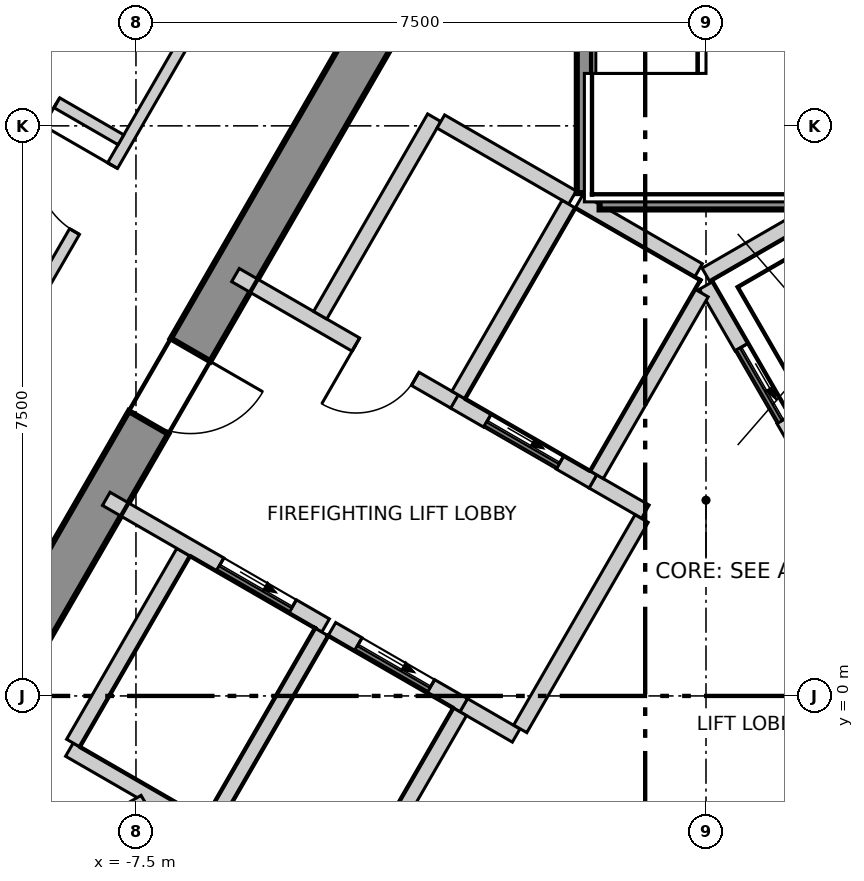
"""IFC4 building model, lengths in metres.
Left out: names, types, materials, properties, quantities, classifications, styles, units other than length and angle.
Written with IfcOpenShell. Run it as: python <this file> out.ifc"""

import sys

from ifc_helpers import new_model, si_unit, direction, frame, frame_2d, origin, place, context, subcontext, project, spatial, polyline, rectangle, outline, extrude, element, fill, save


model = new_model("IFC4")
c1 = context("Model", 3, precision=1e-05, world=origin(), true_north=direction((0.0, 1.0)))
c2 = subcontext(c1, "Body", "Model", "MODEL_VIEW")
j1 = project(units=[si_unit("LENGTHUNIT", "METRE"), si_unit("PLANEANGLEUNIT", "RADIAN")], contexts=[c1])
p1 = place(None, origin())
s1 = spatial("IfcSite", under=j1, at=p1, CompositionType="ELEMENT")
p2 = place(p1, origin())
s2 = spatial("IfcBuilding", under=s1, at=p2, CompositionType="ELEMENT")
p3 = place(p2, frame((0.0, 0.0, 279.1)))
s3 = spatial("IfcBuildingStorey", under=s2, at=p3, CompositionType="ELEMENT", Elevation=279.1)
p4 = place(p3, frame((-1.732, 13.3, -0.3), z_axis=(0.0, 0.0, 1.0), x_axis=(-0.500000539815, -0.866025092122, 0.0)))
e1 = element("IfcWall", 1, at=p4, inside=s3, PredefinedType="SHEAR", context=c2, shape_type="SweptSolid", body=[
    extrude(outline(polyline([(-0.173, -0.3), (1.795, -0.3), (3.763, -0.3), (5.732, -0.3), (7.7, -0.3), (9.668, -0.301), (11.637, -0.301), (13.605, -0.301), (15.573, -0.301), (17.542, -0.301), (19.51, -0.301), (21.478, -0.301), (21.131, 0.3), (19.226, 0.3), (17.321, 0.3), (15.415, 0.3), (13.51, 0.3), (11.605, 0.3), (9.699, 0.3), (7.794, 0.3), (5.889, 0.3), (3.984, 0.3), (2.078, 0.3), (0.173, 0.3), (-0.173, -0.3)])), origin(), (0.0, 0.0, 1.0), 3.6),
])
p5 = place(p4, frame((10.102, 0.0, 0.3)))
e2 = element("IfcOpeningElement", 2, at=p5, cuts=e1, PredefinedType="OPENING", context=c2, shape_type="SweptSolid", body=[
    extrude(rectangle(XDim=1.1, YDim=2.1, at=frame_2d((0.55, 1.05))), frame((0.0, 0.31, 0.0), z_axis=(0.0, -1.0, 0.0), x_axis=(1.0, 0.0, 0.0)), (0.0, 0.0, 1.0), 0.621),
])
p6 = place(p4, frame((15.627, 0.0, 0.3)))
e3 = element("IfcOpeningElement", 3, at=p6, cuts=e1, PredefinedType="OPENING", context=c2, shape_type="SweptSolid", body=[
    extrude(rectangle(XDim=0.9, YDim=2.1, at=frame_2d((0.45, 1.05))), frame((0.0, 0.31, 0.0), z_axis=(0.0, -1.0, 0.0), x_axis=(1.0, 0.0, 0.0)), (0.0, 0.0, 1.0), 0.621),
])
p7 = place(p3, frame((-2.536, 28.316, 0.0), z_axis=(0.0, 0.0, 1.0), x_axis=(-0.500006870765, -0.86602143691, 0.0)))
e4 = element("IfcWall", 4, at=p7, inside=s3, PredefinedType="ELEMENTEDWALL", context=c2, shape_type="SweptSolid", body=[
    extrude(rectangle(XDim=46.49, YDim=0.2, at=frame_2d((23.245, 0.0))), origin(), (0.0, 0.0, 1.0), 3.3),
])
p8 = place(p7, frame((2.196, 0.0, 0.9)))
e5 = element("IfcOpeningElement", 5, at=p8, cuts=e4, PredefinedType="OPENING", context=c2, shape_type="SweptSolid", body=[
    extrude(rectangle(XDim=3.7, YDim=2.2, at=frame_2d((1.85, 1.1))), frame((0.0, 0.11, 0.0), z_axis=(0.0, -1.0, 0.0), x_axis=(1.0, 0.0, 0.0)), (0.0, 0.0, 1.0), 0.22),
])
p9 = place(p7, frame((7.684, 0.0, 0.9)))
e6 = element("IfcOpeningElement", 6, at=p9, cuts=e4, PredefinedType="OPENING", context=c2, shape_type="SweptSolid", body=[
    extrude(rectangle(XDim=3.7, YDim=2.2, at=frame_2d((1.85, 1.1))), frame((0.0, 0.11, 0.0), z_axis=(0.0, -1.0, 0.0), x_axis=(1.0, 0.0, 0.0)), (0.0, 0.0, 1.0), 0.22),
])
p10 = place(p7, frame((13.172, 0.0, 0.9)))
e7 = element("IfcOpeningElement", 7, at=p10, cuts=e4, PredefinedType="OPENING", context=c2, shape_type="SweptSolid", body=[
    extrude(rectangle(XDim=3.7, YDim=2.2, at=frame_2d((1.85, 1.1))), frame((0.0, 0.11, 0.0), z_axis=(0.0, -1.0, 0.0), x_axis=(1.0, 0.0, 0.0)), (0.0, 0.0, 1.0), 0.22),
])
p11 = place(p7, frame((18.66, 0.0, 0.9)))
e8 = element("IfcOpeningElement", 8, at=p11, cuts=e4, PredefinedType="OPENING", context=c2, shape_type="SweptSolid", body=[
    extrude(rectangle(XDim=3.7, YDim=2.2, at=frame_2d((1.85, 1.1))), frame((0.0, 0.11, 0.0), z_axis=(0.0, -1.0, 0.0), x_axis=(1.0, 0.0, 0.0)), (0.0, 0.0, 1.0), 0.22),
])
p12 = place(p7, frame((24.148, 0.0, 0.9)))
e9 = element("IfcOpeningElement", 9, at=p12, cuts=e4, PredefinedType="OPENING", context=c2, shape_type="SweptSolid", body=[
    extrude(rectangle(XDim=3.7, YDim=2.2, at=frame_2d((1.85, 1.1))), frame((0.0, 0.11, 0.0), z_axis=(0.0, -1.0, 0.0), x_axis=(1.0, 0.0, 0.0)), (0.0, 0.0, 1.0), 0.22),
])
p13 = place(p7, frame((29.636, 0.0, 0.9)))
e10 = element("IfcOpeningElement", 10, at=p13, cuts=e4, PredefinedType="OPENING", context=c2, shape_type="SweptSolid", body=[
    extrude(rectangle(XDim=3.7, YDim=2.2, at=frame_2d((1.85, 1.1))), frame((0.0, 0.11, 0.0), z_axis=(0.0, -1.0, 0.0), x_axis=(1.0, 0.0, 0.0)), (0.0, 0.0, 1.0), 0.22),
])
p14 = place(p7, frame((35.124, 0.0, 0.9)))
e11 = element("IfcOpeningElement", 11, at=p14, cuts=e4, PredefinedType="OPENING", context=c2, shape_type="SweptSolid", body=[
    extrude(rectangle(XDim=3.7, YDim=2.2, at=frame_2d((1.85, 1.1))), frame((0.0, 0.11, 0.0), z_axis=(0.0, -1.0, 0.0), x_axis=(1.0, 0.0, 0.0)), (0.0, 0.0, 1.0), 0.22),
])
p15 = place(p7, frame((40.612, 0.0, 0.9)))
e12 = element("IfcOpeningElement", 12, at=p15, cuts=e4, PredefinedType="OPENING", context=c2, shape_type="SweptSolid", body=[
    extrude(rectangle(XDim=3.7, YDim=2.2, at=frame_2d((1.85, 1.1))), frame((0.0, 0.11, 0.0), z_axis=(0.0, -1.0, 0.0), x_axis=(1.0, 0.0, 0.0)), (0.0, 0.0, 1.0), 0.22),
])
p16 = place(p3, frame((-17.678, -10.119, 0.0), z_axis=(0.0, 0.0, 1.0), x_axis=(0.500003190174, 0.866023561929, 0.0)))
e13 = element("IfcWall", 13, at=p16, inside=s3, PredefinedType="PARTITIONING", context=c2, shape_type="SweptSolid", body=[
    extrude(rectangle(XDim=35.356, YDim=0.15, at=frame_2d((17.678, 0.0))), origin(), (0.0, 0.0, 1.0), 3.3),
])
p17 = place(p16, frame((28.706, 0.0, 0.0)))
e14 = element("IfcOpeningElement", 14, at=p17, cuts=e13, PredefinedType="OPENING", context=c2, shape_type="SweptSolid", body=[
    extrude(rectangle(XDim=1.0, YDim=2.1, at=frame_2d((0.5, 1.05))), frame((0.0, 0.085, 0.0), z_axis=(0.0, -1.0, 0.0), x_axis=(1.0, 0.0, 0.0)), (0.0, 0.0, 1.0), 0.17),
])
p18 = place(p16, frame((18.74, 0.0, 0.0)))
e15 = element("IfcOpeningElement", 15, at=p18, cuts=e13, PredefinedType="OPENING", context=c2, shape_type="SweptSolid", body=[
    extrude(rectangle(XDim=1.0, YDim=2.1, at=frame_2d((0.5, 1.05))), frame((0.0, 0.085, 0.0), z_axis=(0.0, -1.0, 0.0), x_axis=(1.0, 0.0, 0.0)), (0.0, 0.0, 1.0), 0.17),
])
p19 = place(p16, frame((9.352, 0.0, 0.0)))
e16 = element("IfcOpeningElement", 16, at=p19, cuts=e13, PredefinedType="OPENING", context=c2, shape_type="SweptSolid", body=[
    extrude(rectangle(XDim=1.0, YDim=2.1, at=frame_2d((0.5, 1.05))), frame((0.0, 0.085, 0.0), z_axis=(0.0, -1.0, 0.0), x_axis=(1.0, 0.0, 0.0)), (0.0, 0.0, 1.0), 0.17),
])
p20 = place(p16, frame((2.777, 0.0, 0.0)))
e17 = element("IfcOpeningElement", 17, at=p20, cuts=e13, PredefinedType="OPENING", context=c2, shape_type="SweptSolid", body=[
    extrude(rectangle(XDim=1.0, YDim=2.1, at=frame_2d((0.5, 1.05))), frame((0.0, 0.085, 0.0), z_axis=(0.0, -1.0, 0.0), x_axis=(1.0, 0.0, 0.0)), (0.0, 0.0, 1.0), 0.17),
])
p21 = place(p3, frame((0.075, 20.37, 0.0), z_axis=(0.0, 0.0, 1.0), x_axis=(0.500003985697, -0.866023102629, 0.0)))
e18 = element("IfcWall", 18, at=p21, inside=s3, PredefinedType="PARTITIONING", context=c2, shape_type="SweptSolid", body=[
    extrude(rectangle(XDim=35.206, YDim=0.15, at=frame_2d((17.603, 0.0))), origin(), (0.0, 0.0, 1.0), 3.3),
])
p22 = place(p21, frame((31.506, 0.0, 0.0)))
e19 = element("IfcOpeningElement", 19, at=p22, cuts=e18, PredefinedType="OPENING", context=c2, shape_type="SweptSolid", body=[
    extrude(rectangle(XDim=1.0, YDim=2.1, at=frame_2d((0.5, 1.05))), frame((0.0, 0.085, 0.0), z_axis=(0.0, -1.0, 0.0), x_axis=(1.0, 0.0, 0.0)), (0.0, 0.0, 1.0), 0.17),
])
p23 = place(p21, frame((26.529, 0.0, 0.0)))
e20 = element("IfcOpeningElement", 20, at=p23, cuts=e18, PredefinedType="OPENING", context=c2, shape_type="SweptSolid", body=[
    extrude(rectangle(XDim=1.0, YDim=2.1, at=frame_2d((0.5, 1.05))), frame((0.0, 0.085, 0.0), z_axis=(0.0, -1.0, 0.0), x_axis=(1.0, 0.0, 0.0)), (0.0, 0.0, 1.0), 0.17),
])
p24 = place(p21, frame((19.442, 0.0, 0.0)))
e21 = element("IfcOpeningElement", 21, at=p24, cuts=e18, PredefinedType="OPENING", context=c2, shape_type="SweptSolid", body=[
    extrude(rectangle(XDim=1.0, YDim=2.1, at=frame_2d((0.5, 1.05))), frame((0.0, 0.085, 0.0), z_axis=(0.0, -1.0, 0.0), x_axis=(1.0, 0.0, 0.0)), (0.0, 0.0, 1.0), 0.17),
])
p25 = place(p21, frame((8.254, 0.0, 0.0)))
e22 = element("IfcOpeningElement", 22, at=p25, cuts=e18, PredefinedType="OPENING", context=c2, shape_type="SweptSolid", body=[
    extrude(rectangle(XDim=1.0, YDim=2.1, at=frame_2d((0.5, 1.05))), frame((0.0, 0.085, 0.0), z_axis=(0.0, -1.0, 0.0), x_axis=(1.0, 0.0, 0.0)), (0.0, 0.0, 1.0), 0.17),
])
p26 = place(p21, frame((13.754, 0.0, 0.0)))
e23 = element("IfcOpeningElement", 23, at=p26, cuts=e18, PredefinedType="OPENING", context=c2, shape_type="SweptSolid", body=[
    extrude(rectangle(XDim=0.9, YDim=2.1, at=frame_2d((0.45, 1.05))), frame((0.0, 0.085, 0.0), z_axis=(0.0, -1.0, 0.0), x_axis=(1.0, 0.0, 0.0)), (0.0, 0.0, 1.0), 0.17),
])
p27 = place(p21, frame((11.554, 0.0, 0.0)))
e24 = element("IfcOpeningElement", 24, at=p27, cuts=e18, PredefinedType="OPENING", context=c2, shape_type="SweptSolid", body=[
    extrude(rectangle(XDim=0.9, YDim=2.1, at=frame_2d((0.45, 1.05))), frame((0.0, 0.085, 0.0), z_axis=(0.0, -1.0, 0.0), x_axis=(1.0, 0.0, 0.0)), (0.0, 0.0, 1.0), 0.17),
])
p28 = place(p21, frame((2.777, 0.0, 0.0)))
e25 = element("IfcOpeningElement", 25, at=p28, cuts=e18, PredefinedType="OPENING", context=c2, shape_type="SweptSolid", body=[
    extrude(rectangle(XDim=1.0, YDim=2.1, at=frame_2d((0.5, 1.05))), frame((0.0, 0.085, 0.0), z_axis=(0.0, -1.0, 0.0), x_axis=(1.0, 0.0, 0.0)), (0.0, 0.0, 1.0), 0.17),
])
p29 = place(p3, frame((-10.166, 8.742, 0.0), z_axis=(0.0, 0.0, 1.0), x_axis=(0.866004402611, -0.500036373335, 0.0)))
e26 = element("IfcWall", 26, at=p29, inside=s3, PredefinedType="PARTITIONING", context=c2, shape_type="SweptSolid", body=[
    extrude(rectangle(XDim=2.85, YDim=0.15, at=frame_2d((1.425, 0.0))), origin(), (0.0, 0.0, 1.0), 3.3),
])
p30 = place(p29, frame((0.975, 0.0, 0.0)))
e27 = element("IfcOpeningElement", 27, at=p30, cuts=e26, PredefinedType="OPENING", context=c2, shape_type="SweptSolid", body=[
    extrude(rectangle(XDim=0.9, YDim=2.1, at=frame_2d((0.45, 1.05))), frame((0.0, 0.085, 0.0), z_axis=(0.0, -1.0, 0.0), x_axis=(1.0, 0.0, 0.0)), (0.0, 0.0, 1.0), 0.17),
])
p31 = place(p3, frame((-8.376, -0.707, 0.0), z_axis=(0.0, 0.0, 1.0), x_axis=(0.866067520717, -0.499927044236, 0.0)))
e28 = element("IfcWall", 28, at=p31, inside=s3, PredefinedType="SOLIDWALL", context=c2, shape_type="SweptSolid", body=[
    extrude(rectangle(XDim=2.1, YDim=0.2, at=frame_2d((1.05, 0.0))), origin(), (0.0, 0.0, 1.0), 3.3),
])
p32 = place(p3, frame((-8.326, -0.62, 0.0), z_axis=(0.0, 0.0, 1.0), x_axis=(0.500023687443, 0.866011727401, 0.0)))
e29 = element("IfcWall", 29, at=p32, inside=s3, PredefinedType="SOLIDWALL", context=c2, shape_type="SweptSolid", body=[
    extrude(rectangle(XDim=2.9, YDim=0.2, at=frame_2d((1.45, 0.0))), origin(), (0.0, 0.0, 1.0), 3.3),
])
p33 = place(p3, frame((-0.002, 5.541, 0.0), z_axis=(0.0, 0.0, 1.0), x_axis=(0.86600155993, 0.500041296494, 0.0)))
e30 = element("IfcWall", 30, at=p33, inside=s3, PredefinedType="SOLIDWALL", context=c2, shape_type="SweptSolid", body=[
    extrude(rectangle(XDim=4.132, YDim=0.2, at=frame_2d((2.066, 0.0))), origin(), (0.0, 0.0, 1.0), 3.3),
])
p34 = place(p3, frame((0.0, 5.4, 0.0), z_axis=(0.0, 0.0, 1.0), x_axis=(0.500103862429, -0.865965430478, 0.0)))
e31 = element("IfcWall", 31, at=p34, inside=s3, PredefinedType="SOLIDWALL", context=c2, shape_type="SweptSolid", body=[
    extrude(rectangle(XDim=2.973, YDim=0.2, at=frame_2d((1.487, 0.0))), origin(), (0.0, 0.0, 1.0), 3.3),
])
p35 = place(p34, frame((0.937, 0.0, 0.0)))
e32 = element("IfcOpeningElement", 32, at=p35, cuts=e31, PredefinedType="OPENING", context=c2, shape_type="SweptSolid", body=[
    extrude(rectangle(XDim=1.1, YDim=2.1, at=frame_2d((0.55, 1.05))), frame((0.0, 0.11, 0.0), z_axis=(0.0, -1.0, 0.0), x_axis=(1.0, 0.0, 0.0)), (0.0, 0.0, 1.0), 0.22),
])
p36 = place(p3, frame((-7.891, 2.593, 0.0), z_axis=(0.0, 0.0, 1.0), x_axis=(0.866070917804, -0.499921159118, 0.0)))
e33 = element("IfcWall", 33, at=p36, inside=s3, PredefinedType="SOLIDWALL", context=c2, shape_type="SweptSolid", body=[
    extrude(rectangle(XDim=3.333, YDim=0.2, at=frame_2d((1.666, 0.0))), origin(), (0.0, 0.0, 1.0), 3.3),
])
p37 = place(p36, frame((1.73, 0.0, 0.0)))
e34 = element("IfcOpeningElement", 34, at=p37, cuts=e33, PredefinedType="OPENING", context=c2, shape_type="SweptSolid", body=[
    extrude(rectangle(XDim=1.1, YDim=2.1, at=frame_2d((0.55, 1.05))), frame((0.0, 0.11, 0.0), z_axis=(0.0, -1.0, 0.0), x_axis=(1.0, 0.0, 0.0)), (0.0, 0.0, 1.0), 0.22),
])
p38 = place(p3, frame((-3.188, -0.122, 0.0), z_axis=(0.0, 0.0, 1.0), x_axis=(0.865705793592, -0.50055317294, 0.0)))
e35 = element("IfcWall", 35, at=p38, inside=s3, PredefinedType="SOLIDWALL", context=c2, shape_type="SweptSolid", body=[
    extrude(rectangle(XDim=0.797, YDim=0.2, at=frame_2d((0.398, 0.0))), origin(), (0.0, 0.0, 1.0), 3.3),
])
p39 = place(p3, frame((-6.191, 5.537, 0.0), z_axis=(0.0, 0.0, 1.0), x_axis=(0.866052607023, -0.499952879648, 0.0)))
e36 = element("IfcWall", 36, at=p39, inside=s3, PredefinedType="SOLIDWALL", context=c2, shape_type="SweptSolid", body=[
    extrude(rectangle(XDim=3.332, YDim=0.2, at=frame_2d((1.666, 0.0))), origin(), (0.0, 0.0, 1.0), 3.3),
])
p40 = place(p39, frame((1.83, 0.0, 0.0)))
e37 = element("IfcOpeningElement", 37, at=p40, cuts=e36, PredefinedType="OPENING", context=c2, shape_type="SweptSolid", body=[
    extrude(rectangle(XDim=0.9, YDim=2.1, at=frame_2d((0.45, 1.05))), frame((0.0, 0.11, 0.0), z_axis=(0.0, -1.0, 0.0), x_axis=(1.0, 0.0, 0.0)), (0.0, 0.0, 1.0), 0.22),
])
p41 = place(p3, frame((-1.488, 2.822, 0.0), z_axis=(0.0, 0.0, 1.0), x_axis=(0.866236612152, -0.499633997809, 0.0)))
e38 = element("IfcWall", 38, at=p41, inside=s3, PredefinedType="SOLIDWALL", context=c2, shape_type="SweptSolid", body=[
    extrude(rectangle(XDim=0.796, YDim=0.2, at=frame_2d((0.398, 0.0))), origin(), (0.0, 0.0, 1.0), 3.3),
])
p42 = place(p3, frame((-5.076, 5.009, 0.0), z_axis=(0.0, 0.0, 1.0), x_axis=(0.50002537861, 0.866010750942, 0.0)))
e39 = element("IfcWall", 39, at=p42, inside=s3, PredefinedType="SOLIDWALL", context=c2, shape_type="SweptSolid", body=[
    extrude(rectangle(XDim=3.0, YDim=0.2, at=frame_2d((1.5, 0.0))), origin(), (0.0, 0.0, 1.0), 3.3),
])
p43 = place(p3, frame((-3.489, 7.557, 0.0), z_axis=(0.0, 0.0, 1.0), x_axis=(0.866010750942, -0.50002537861, 0.0)))
e40 = element("IfcWall", 40, at=p43, inside=s3, PredefinedType="SOLIDWALL", context=c2, shape_type="SweptSolid", body=[
    extrude(rectangle(XDim=2.0, YDim=0.2, at=frame_2d((1.0, 0.0))), origin(), (0.0, 0.0, 1.0), 3.3),
])
p44 = place(p3, frame((-2.444, -0.433, 0.0), z_axis=(0.0, 0.0, 1.0), x_axis=(0.500035624827, 0.866004834804, 0.0)))
e41 = element("IfcWall", 41, at=p44, inside=s3, PredefinedType="SOLIDWALL", context=c2, shape_type="SweptSolid", body=[
    extrude(rectangle(XDim=3.194, YDim=0.2, at=frame_2d((1.597, 0.0))), origin(), (0.0, 0.0, 1.0), 3.3),
])
p45 = place(p3, frame((-6.507, -1.67, 0.0), z_axis=(0.0, 0.0, 1.0), x_axis=(0.50012328804, 0.865954211699, 0.0)))
e42 = element("IfcWall", 42, at=p45, inside=s3, PredefinedType="SOLIDWALL", context=c2, shape_type="SweptSolid", body=[
    extrude(rectangle(XDim=2.9, YDim=0.2, at=frame_2d((1.45, 0.0))), origin(), (0.0, 0.0, 1.0), 3.3),
])
p46 = place(p3, frame((-4.922, 0.879, 0.0), z_axis=(0.0, 0.0, 1.0), x_axis=(0.866073918653, -0.499915960366, 0.0)))
e43 = element("IfcWall", 43, at=p46, inside=s3, PredefinedType="SOLIDWALL", context=c2, shape_type="SweptSolid", body=[
    extrude(rectangle(XDim=2.002, YDim=0.2, at=frame_2d((1.001, 0.0))), origin(), (0.0, 0.0, 1.0), 3.3),
])
p47 = place(p46, frame((0.402, 0.0, 0.0)))
e44 = element("IfcOpeningElement", 44, at=p47, cuts=e43, PredefinedType="OPENING", context=c2, shape_type="SweptSolid", body=[
    extrude(rectangle(XDim=1.1, YDim=2.1, at=frame_2d((0.55, 1.05))), frame((0.0, 0.11, 0.0), z_axis=(0.0, -1.0, 0.0), x_axis=(1.0, 0.0, 0.0)), (0.0, 0.0, 1.0), 0.22),
])
p48 = place(p3, frame((-4.619, -2.6, 0.0), z_axis=(0.0, 0.0, 1.0), x_axis=(0.50009492287, 0.865970593103, 0.0)))
e45 = element("IfcWall", 45, at=p48, inside=s3, PredefinedType="SOLIDWALL", context=c2, shape_type="SweptSolid", body=[
    extrude(rectangle(XDim=2.761, YDim=0.2, at=frame_2d((1.381, 0.0))), origin(), (0.0, 0.0, 1.0), 3.3),
])
p49 = place(p3, frame((-3.309, 3.873, 0.0), z_axis=(0.0, 0.0, 1.0), x_axis=(0.866098583652, -0.499873227325, 0.0)))
e46 = element("IfcWall", 46, at=p49, inside=s3, PredefinedType="SOLIDWALL", context=c2, shape_type="SweptSolid", body=[
    extrude(rectangle(XDim=2.103, YDim=0.2, at=frame_2d((1.051, 0.0))), origin(), (0.0, 0.0, 1.0), 3.3),
])
p50 = place(p49, frame((0.502, 0.0, 0.0)))
e47 = element("IfcOpeningElement", 47, at=p50, cuts=e46, PredefinedType="OPENING", context=c2, shape_type="SweptSolid", body=[
    extrude(rectangle(XDim=1.1, YDim=2.1, at=frame_2d((0.55, 1.05))), frame((0.0, 0.11, 0.0), z_axis=(0.0, -1.0, 0.0), x_axis=(1.0, 0.0, 0.0)), (0.0, 0.0, 1.0), 0.22),
])
p51 = place(p3, frame((-3.257, 3.959, 0.0), z_axis=(0.0, 0.0, 1.0), x_axis=(0.50012328804, 0.865954211699, 0.0)))
e48 = element("IfcWall", 48, at=p51, inside=s3, PredefinedType="SOLIDWALL", context=c2, shape_type="SweptSolid", body=[
    extrude(rectangle(XDim=2.9, YDim=0.2, at=frame_2d((1.45, 0.0))), origin(), (0.0, 0.0, 1.0), 3.3),
])
p52 = place(p3, frame((-1.67, 6.507, 0.0), z_axis=(0.0, 0.0, 1.0), x_axis=(0.865941441609, -0.500145398563, 0.0)))
e49 = element("IfcWall", 49, at=p52, inside=s3, PredefinedType="SOLIDWALL", context=c2, shape_type="SweptSolid", body=[
    extrude(rectangle(XDim=1.815, YDim=0.2, at=frame_2d((0.908, 0.0))), origin(), (0.0, 0.0, 1.0), 3.3),
])
p53 = place(p3, frame((-1.438, 2.909, 0.0), z_axis=(0.0, 0.0, 1.0), x_axis=(0.499829630636, 0.866123744241, 0.0)))
e50 = element("IfcWall", 50, at=p53, inside=s3, PredefinedType="SOLIDWALL", context=c2, shape_type="SweptSolid", body=[
    extrude(rectangle(XDim=2.761, YDim=0.2, at=frame_2d((1.38, 0.0))), origin(), (0.0, 0.0, 1.0), 3.3),
])
p54 = place(p3, frame((-11.598, -3.829, 0.0), z_axis=(0.0, 0.0, 1.0), x_axis=(0.865968383994, 0.500098748171, 0.0)))
e51 = element("IfcWall", 51, at=p54, inside=s3, PredefinedType="SOLIDWALL", context=c2, shape_type="SweptSolid", body=[
    extrude(rectangle(XDim=4.867, YDim=0.2, at=frame_2d((2.434, 0.0))), origin(), (0.0, 0.0, 1.0), 3.3),
])
p55 = place(p3, frame((-1.4, 6.5, 0.0), z_axis=(0.0, 0.0, 1.0), x_axis=(1.0, 0.0, 0.0)))
e52 = element("IfcWall", 52, at=p55, inside=s3, PredefinedType="SOLIDWALL", context=c2, shape_type="SweptSolid", body=[
    extrude(rectangle(XDim=2.8, YDim=0.2, at=frame_2d((1.4, 0.0))), origin(), (0.0, 0.0, 1.0), 3.3),
])
p56 = place(p3, frame((-1.6, 6.615, 0.0), z_axis=(0.0, 0.0, 1.0), x_axis=(0.0, 1.0, 0.0)))
e53 = element("IfcWall", 53, at=p56, inside=s3, PredefinedType="SOLIDWALL", context=c2, shape_type="SweptSolid", body=[
    extrude(rectangle(XDim=6.665, YDim=0.2, at=frame_2d((3.333, 0.0))), origin(), (0.0, 0.0, 1.0), 3.3),
])
p57 = place(p35, origin())
e54 = element("IfcDoor", 54, at=p57, inside=s3, OperationType="SLIDING_TO_LEFT", PredefinedType="DOOR", context=c2, shape_type="SweptSolid", body=[
    extrude(rectangle(XDim=1.1, YDim=2.1, at=frame_2d((0.55, 1.05))), frame((0.0, 0.025, 0.0), z_axis=(0.0, -1.0, 0.0), x_axis=(1.0, 0.0, 0.0)), (0.0, 0.0, 1.0), 0.05),
])
fill(e32, e54)
p58 = place(p47, origin())
e55 = element("IfcDoor", 55, at=p58, inside=s3, OperationType="SLIDING_TO_LEFT", PredefinedType="DOOR", context=c2, shape_type="SweptSolid", body=[
    extrude(rectangle(XDim=1.1, YDim=2.1, at=frame_2d((0.55, 1.05))), frame((0.0, 0.025, 0.0), z_axis=(0.0, -1.0, 0.0), x_axis=(1.0, 0.0, 0.0)), (0.0, 0.0, 1.0), 0.05),
])
fill(e44, e55)
p59 = place(p50, origin())
e56 = element("IfcDoor", 56, at=p59, inside=s3, OperationType="SLIDING_TO_LEFT", PredefinedType="DOOR", context=c2, shape_type="SweptSolid", body=[
    extrude(rectangle(XDim=1.1, YDim=2.1, at=frame_2d((0.55, 1.05))), frame((0.0, 0.025, 0.0), z_axis=(0.0, -1.0, 0.0), x_axis=(1.0, 0.0, 0.0)), (0.0, 0.0, 1.0), 0.05),
])
fill(e47, e56)
p60 = place(p37, origin())
e57 = element("IfcDoor", 57, at=p60, inside=s3, OperationType="SLIDING_TO_LEFT", PredefinedType="DOOR", context=c2, shape_type="SweptSolid", body=[
    extrude(rectangle(XDim=1.1, YDim=2.1, at=frame_2d((0.55, 1.05))), frame((0.0, 0.025, 0.0), z_axis=(0.0, -1.0, 0.0), x_axis=(1.0, 0.0, 0.0)), (0.0, 0.0, 1.0), 0.05),
])
fill(e34, e57)
p61 = place(p40, origin())
e58 = element("IfcDoor", 58, at=p61, inside=s3, OperationType="SINGLE_SWING_LEFT", PredefinedType="DOOR", context=c2, shape_type="SweptSolid", body=[
    extrude(rectangle(XDim=0.9, YDim=2.1, at=frame_2d((0.45, 1.05))), frame((0.0, 0.025, 0.0), z_axis=(0.0, -1.0, 0.0), x_axis=(1.0, 0.0, 0.0)), (0.0, 0.0, 1.0), 0.05),
])
fill(e37, e58)
p62 = place(p18, origin())
e59 = element("IfcDoor", 59, at=p62, inside=s3, OperationType="SINGLE_SWING_LEFT", PredefinedType="DOOR", context=c2, shape_type="SweptSolid", body=[
    extrude(rectangle(XDim=1.0, YDim=2.1, at=frame_2d((0.5, 1.05))), frame((0.0, 0.025, 0.0), z_axis=(0.0, -1.0, 0.0), x_axis=(1.0, 0.0, 0.0)), (0.0, 0.0, 1.0), 0.05),
])
fill(e15, e59)
p63 = place(p30, origin())
e60 = element("IfcDoor", 60, at=p63, inside=s3, OperationType="SINGLE_SWING_RIGHT", PredefinedType="DOOR", context=c2, shape_type="SweptSolid", body=[
    extrude(rectangle(XDim=0.9, YDim=2.1, at=frame_2d((0.45, 1.05))), frame((0.0, 0.025, 0.0), z_axis=(0.0, -1.0, 0.0), x_axis=(1.0, 0.0, 0.0)), (0.0, 0.0, 1.0), 0.05),
])
fill(e27, e60)
p64 = place(p5, origin())
e61 = element("IfcDoor", 61, at=p64, inside=s3, OperationType="SINGLE_SWING_RIGHT", PredefinedType="DOOR", context=c2, shape_type="SweptSolid", body=[
    extrude(rectangle(XDim=1.1, YDim=2.1, at=frame_2d((0.55, 1.05))), frame((0.0, 0.025, 0.0), z_axis=(0.0, -1.0, 0.0), x_axis=(1.0, 0.0, 0.0)), (0.0, 0.0, 1.0), 0.05),
])
fill(e2, e61)
save(model, sys.argv[1])
